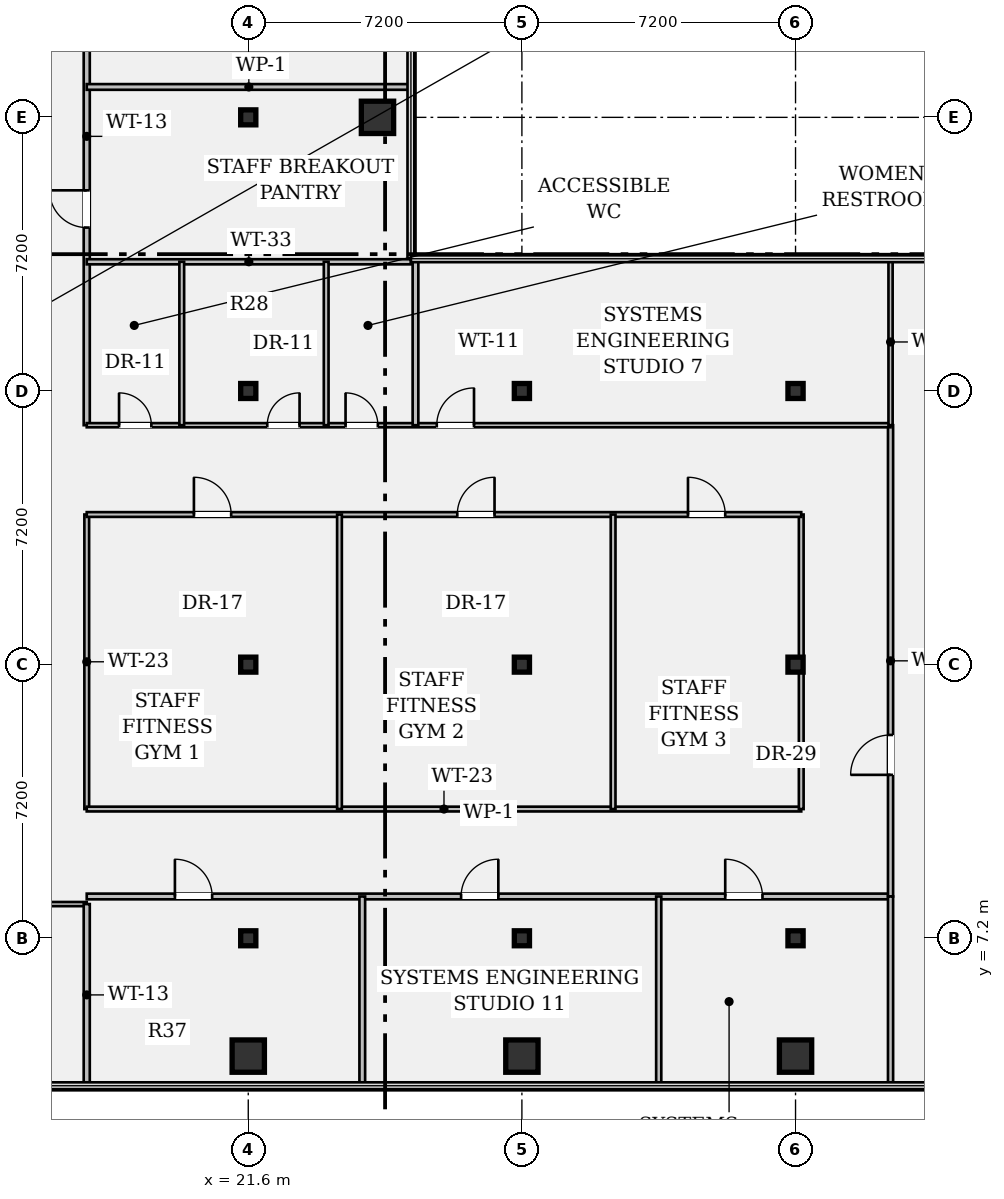
"""IFC4 building model, lengths in metres.
Left out: names, types, materials, properties, quantities, classifications, styles, units other than length and angle.
Written with IfcOpenShell. Run it as: python <this file> out.ifc"""

import sys

from ifc_helpers import new_model, si_unit, direction, frame, frame_2d, origin, origin_2d, place, context, subcontext, project, spatial, rectangle, hollow_rectangle, i_section, extrude, element, fill, save


model = new_model("IFC4")
c1 = context("Model", 3, precision=1e-05, world=origin(), true_north=direction((0.0, 1.0)))
c2 = subcontext(c1, "Body", "Model", "MODEL_VIEW")
j1 = project(units=[si_unit("LENGTHUNIT", "METRE"), si_unit("PLANEANGLEUNIT", "RADIAN")], contexts=[c1])
p1 = place(None, origin())
s1 = spatial("IfcSite", under=j1, at=p1, CompositionType="ELEMENT")
p2 = place(p1, origin())
s2 = spatial("IfcBuilding", under=s1, at=p2, CompositionType="ELEMENT")
p3 = place(p2, frame((0.0, 0.0, 159.95)))
s3 = spatial("IfcBuildingStorey", under=s2, at=p3, CompositionType="ELEMENT", Elevation=159.95)
p4 = place(p3, frame((21.6, 4.1, 0.0), z_axis=(0.0, 0.0, 1.0), x_axis=(1.0, 0.0, 0.0)))
e1 = element("IfcColumn", 1, at=p4, inside=s3, PredefinedType="COLUMN", context=c2, shape_type="SweptSolid", body=[
    extrude(hollow_rectangle(XDim=0.85, YDim=0.85, WallThickness=0.05, at=origin_2d()), origin(), (0.0, 0.0, 1.0), 3.58),
])
for number, where, z_axis, x_axis in (
    (2, (21.6, 7.2, 0.0), (0.0, 0.0, 1.0), (1.0, 0.0, 0.0)),
    (3, (21.6, 14.4, 0.0), (0.0, 0.0, 1.0), (1.0, 0.0, 0.0)),
    (4, (21.6, 21.6, 0.0), (0.0, 0.0, 1.0), (1.0, 0.0, 0.0)),
    (5, (21.6, 28.8, 0.0), (0.0, 0.0, 1.0), (1.0, 0.0, 0.0)),
):
    element("IfcColumn", number, at=place(p3, frame(where, z_axis=z_axis, x_axis=x_axis)), inside=s3, PredefinedType="COLUMN", context=c2, shape_type="SweptSolid", body=[
        extrude(i_section(OverallWidth=0.399, OverallDepth=0.394, WebThickness=0.023, FlangeThickness=0.037, FilletRadius=0.018, at=origin_2d()), origin(), (0.0, 0.0, 1.0), 3.58),
    ])
p5 = place(p3, frame((25.0, 28.8, 0.0), z_axis=(0.0, 0.0, 1.0), x_axis=(1.0, 0.0, 0.0)))
e6 = element("IfcColumn", 6, at=p5, inside=s3, PredefinedType="COLUMN", context=c2, shape_type="SweptSolid", body=[
    extrude(hollow_rectangle(XDim=0.85, YDim=0.85, WallThickness=0.05, at=origin_2d()), origin(), (0.0, 0.0, 1.0), 3.85),
])
p6 = place(p3, frame((28.8, 4.1, 0.0), z_axis=(0.0, 0.0, 1.0), x_axis=(1.0, 0.0, 0.0)))
e7 = element("IfcColumn", 7, at=p6, inside=s3, PredefinedType="COLUMN", context=c2, shape_type="SweptSolid", body=[
    extrude(hollow_rectangle(XDim=0.85, YDim=0.85, WallThickness=0.05, at=origin_2d()), origin(), (0.0, 0.0, 1.0), 3.58),
])
for number, where, z_axis, x_axis in (
    (8, (28.8, 7.2, 0.0), (0.0, 0.0, 1.0), (1.0, 0.0, 0.0)),
    (9, (28.8, 14.4, 0.0), (0.0, 0.0, 1.0), (1.0, 0.0, 0.0)),
    (10, (28.8, 21.6, 0.0), (0.0, 0.0, 1.0), (1.0, 0.0, 0.0)),
):
    element("IfcColumn", number, at=place(p3, frame(where, z_axis=z_axis, x_axis=x_axis)), inside=s3, PredefinedType="COLUMN", context=c2, shape_type="SweptSolid", body=[
        extrude(i_section(OverallWidth=0.399, OverallDepth=0.394, WebThickness=0.023, FlangeThickness=0.037, FilletRadius=0.018, at=origin_2d()), origin(), (0.0, 0.0, 1.0), 3.58),
    ])
p7 = place(p3, frame((36.0, 4.1, 0.0), z_axis=(0.0, 0.0, 1.0), x_axis=(1.0, 0.0, 0.0)))
e11 = element("IfcColumn", 11, at=p7, inside=s3, PredefinedType="COLUMN", context=c2, shape_type="SweptSolid", body=[
    extrude(hollow_rectangle(XDim=0.85, YDim=0.85, WallThickness=0.05, at=origin_2d()), origin(), (0.0, 0.0, 1.0), 3.58),
])
for number, where, z_axis, x_axis in (
    (12, (36.0, 7.2, 0.0), (0.0, 0.0, 1.0), (1.0, 0.0, 0.0)),
    (13, (36.0, 14.4, 0.0), (0.0, 0.0, 1.0), (1.0, 0.0, 0.0)),
    (14, (36.0, 21.6, 0.0), (0.0, 0.0, 1.0), (1.0, 0.0, 0.0)),
):
    element("IfcColumn", number, at=place(p3, frame(where, z_axis=z_axis, x_axis=x_axis)), inside=s3, PredefinedType="COLUMN", context=c2, shape_type="SweptSolid", body=[
        extrude(i_section(OverallWidth=0.399, OverallDepth=0.394, WebThickness=0.023, FlangeThickness=0.037, FilletRadius=0.018, at=origin_2d()), origin(), (0.0, 0.0, 1.0), 3.58),
    ])
p8 = place(p3, frame((14.4, 8.1, 0.0), z_axis=(0.0, 0.0, 1.0), x_axis=(1.0, 0.0, 0.0)))
e15 = element("IfcWall", 15, at=p8, inside=s3, PredefinedType="PARTITIONING", context=c2, shape_type="SweptSolid", body=[
    extrude(rectangle(XDim=2.95, YDim=0.11, at=frame_2d((1.475, 0.0))), origin(), (0.0, 0.0, 1.0), 3.148),
])
p9 = place(p8, frame((0.95, 0.0, 0.0)))
e16 = element("IfcOpeningElement", 16, at=p9, cuts=e15, PredefinedType="OPENING", context=c2, shape_type="SweptSolid", body=[
    extrude(rectangle(XDim=0.98, YDim=2.15, at=frame_2d((0.49, 1.075))), frame((0.0, 0.067, 0.0), z_axis=(0.0, -1.0, 0.0), x_axis=(1.0, 0.0, 0.0)), (0.0, 0.0, 1.0), 0.134),
])
p10 = place(p3, frame((17.35, 20.7, 0.0), z_axis=(0.0, 0.0, 1.0), x_axis=(0.0, 1.0, 0.0)))
e17 = element("IfcWall", 17, at=p10, inside=s3, PredefinedType="PARTITIONING", context=c2, shape_type="SweptSolid", body=[
    extrude(rectangle(XDim=15.2, YDim=0.16, at=frame_2d((7.6, 0.0))), origin(), (0.0, 0.0, 1.0), 2.869),
])
p11 = place(p10, frame((5.2, 0.0, 0.0)))
e18 = element("IfcOpeningElement", 18, at=p11, cuts=e17, PredefinedType="OPENING", context=c2, shape_type="SweptSolid", body=[
    extrude(rectangle(XDim=0.98, YDim=2.15, at=frame_2d((0.49, 1.075))), frame((0.0, 0.092, 0.0), z_axis=(0.0, -1.0, 0.0), x_axis=(1.0, 0.0, 0.0)), (0.0, 0.0, 1.0), 0.184),
])
p12 = place(p10, frame((10.6, 0.0, 0.0)))
e19 = element("IfcOpeningElement", 19, at=p12, cuts=e17, PredefinedType="OPENING", context=c2, shape_type="SweptSolid", body=[
    extrude(rectangle(XDim=1.0, YDim=2.15, at=frame_2d((0.5, 1.075))), frame((0.0, 0.092, 0.0), z_axis=(0.0, -1.0, 0.0), x_axis=(1.0, 0.0, 0.0)), (0.0, 0.0, 1.0), 0.184),
])
p13 = place(p3, frame((17.35, 8.3, 0.0), z_axis=(0.0, 0.0, 1.0), x_axis=(1.0, 0.0, 0.0)))
e20 = element("IfcWall", 20, at=p13, inside=s3, PredefinedType="PARTITIONING", context=c2, shape_type="SweptSolid", body=[
    extrude(rectangle(XDim=21.15, YDim=0.15, at=frame_2d((10.575, 0.0))), origin(), (0.0, 0.0, 1.0), 2.869),
])
p14 = place(p13, frame((2.32, 0.0, 0.0)))
e21 = element("IfcOpeningElement", 21, at=p14, cuts=e20, PredefinedType="OPENING", context=c2, shape_type="SweptSolid", body=[
    extrude(rectangle(XDim=0.98, YDim=2.15, at=frame_2d((0.49, 1.075))), frame((0.0, 0.087, 0.0), z_axis=(0.0, -1.0, 0.0), x_axis=(1.0, 0.0, 0.0)), (0.0, 0.0, 1.0), 0.174),
])
p15 = place(p13, frame((9.85, 0.0, 0.0)))
e22 = element("IfcOpeningElement", 22, at=p15, cuts=e20, PredefinedType="OPENING", context=c2, shape_type="SweptSolid", body=[
    extrude(rectangle(XDim=0.98, YDim=2.15, at=frame_2d((0.49, 1.075))), frame((0.0, 0.087, 0.0), z_axis=(0.0, -1.0, 0.0), x_axis=(1.0, 0.0, 0.0)), (0.0, 0.0, 1.0), 0.174),
])
p16 = place(p13, frame((16.8, 0.0, 0.0)))
e23 = element("IfcOpeningElement", 23, at=p16, cuts=e20, PredefinedType="OPENING", context=c2, shape_type="SweptSolid", body=[
    extrude(rectangle(XDim=0.98, YDim=2.15, at=frame_2d((0.49, 1.075))), frame((0.0, 0.087, 0.0), z_axis=(0.0, -1.0, 0.0), x_axis=(1.0, 0.0, 0.0)), (0.0, 0.0, 1.0), 0.174),
])
p17 = place(p3, frame((38.5, 8.3, 0.0), z_axis=(0.0, 0.0, 1.0), x_axis=(0.0, 1.0, 0.0)))
e24 = element("IfcWall", 24, at=p17, inside=s3, PredefinedType="PARTITIONING", context=c2, shape_type="SweptSolid", body=[
    extrude(rectangle(XDim=12.4, YDim=0.135, at=frame_2d((6.2, 0.0))), origin(), (0.0, 0.0, 1.0), 2.869),
])
p18 = place(p17, frame((3.2, 0.0, 0.0)))
e25 = element("IfcOpeningElement", 25, at=p18, cuts=e24, PredefinedType="OPENING", context=c2, shape_type="SweptSolid", body=[
    extrude(rectangle(XDim=1.05, YDim=2.15, at=frame_2d((0.525, 1.075))), frame((0.0, 0.08, 0.0), z_axis=(0.0, -1.0, 0.0), x_axis=(1.0, 0.0, 0.0)), (0.0, 0.0, 1.0), 0.159),
])
p19 = place(p3, frame((17.35, 20.7, 0.0), z_axis=(0.0, 0.0, 1.0), x_axis=(1.0, 0.0, 0.0)))
e26 = element("IfcWall", 26, at=p19, inside=s3, PredefinedType="PARTITIONING", context=c2, shape_type="SweptSolid", body=[
    extrude(rectangle(XDim=21.15, YDim=0.11, at=frame_2d((10.575, 0.0))), origin(), (0.0, 0.0, 1.0), 2.869),
])
p20 = place(p19, frame((0.85, 0.0, 0.0)))
e27 = element("IfcOpeningElement", 27, at=p20, cuts=e26, PredefinedType="OPENING", context=c2, shape_type="SweptSolid", body=[
    extrude(rectangle(XDim=0.85, YDim=2.15, at=frame_2d((0.425, 1.075))), frame((0.0, 0.067, 0.0), z_axis=(0.0, -1.0, 0.0), x_axis=(1.0, 0.0, 0.0)), (0.0, 0.0, 1.0), 0.134),
])
p21 = place(p19, frame((4.75, 0.0, 0.0)))
e28 = element("IfcOpeningElement", 28, at=p21, cuts=e26, PredefinedType="OPENING", context=c2, shape_type="SweptSolid", body=[
    extrude(rectangle(XDim=0.85, YDim=2.15, at=frame_2d((0.425, 1.075))), frame((0.0, 0.067, 0.0), z_axis=(0.0, -1.0, 0.0), x_axis=(1.0, 0.0, 0.0)), (0.0, 0.0, 1.0), 0.134),
])
p22 = place(p19, frame((6.81, 0.0, 0.0)))
e29 = element("IfcOpeningElement", 29, at=p22, cuts=e26, PredefinedType="OPENING", context=c2, shape_type="SweptSolid", body=[
    extrude(rectangle(XDim=0.85, YDim=2.15, at=frame_2d((0.425, 1.075))), frame((0.0, 0.067, 0.0), z_axis=(0.0, -1.0, 0.0), x_axis=(1.0, 0.0, 0.0)), (0.0, 0.0, 1.0), 0.134),
])
p23 = place(p19, frame((9.21, 0.0, 0.0)))
e30 = element("IfcOpeningElement", 30, at=p23, cuts=e26, PredefinedType="OPENING", context=c2, shape_type="SweptSolid", body=[
    extrude(rectangle(XDim=0.98, YDim=2.15, at=frame_2d((0.49, 1.075))), frame((0.0, 0.067, 0.0), z_axis=(0.0, -1.0, 0.0), x_axis=(1.0, 0.0, 0.0)), (0.0, 0.0, 1.0), 0.134),
])
p24 = place(p3, frame((17.35, 10.6, 0.0), z_axis=(0.0, 0.0, 1.0), x_axis=(0.0, 1.0, 0.0)))
e31 = element("IfcWall", 31, at=p24, inside=s3, PredefinedType="PARTITIONING", context=c2, shape_type="SweptSolid", body=[
    extrude(rectangle(XDim=7.75, YDim=0.125, at=frame_2d((3.875, 0.0))), origin(), (0.0, 0.0, 1.0), 2.869),
])
p25 = place(p3, frame((17.35, 10.6, 0.0), z_axis=(0.0, 0.0, 1.0), x_axis=(1.0, 0.0, 0.0)))
e32 = element("IfcWall", 32, at=p25, inside=s3, PredefinedType="PARTITIONING", context=c2, shape_type="SweptSolid", body=[
    extrude(rectangle(XDim=18.8, YDim=0.125, at=frame_2d((9.4, 0.0))), origin(), (0.0, 0.0, 1.0), 2.869),
])
p26 = place(p3, frame((36.15, 10.6, 0.0), z_axis=(0.0, 0.0, 1.0), x_axis=(0.0, 1.0, 0.0)))
e33 = element("IfcWall", 33, at=p26, inside=s3, PredefinedType="PARTITIONING", context=c2, shape_type="SweptSolid", body=[
    extrude(rectangle(XDim=7.75, YDim=0.125, at=frame_2d((3.875, 0.0))), origin(), (0.0, 0.0, 1.0), 2.869),
])
p27 = place(p3, frame((17.35, 18.35, 0.0), z_axis=(0.0, 0.0, 1.0), x_axis=(1.0, 0.0, 0.0)))
e34 = element("IfcWall", 34, at=p27, inside=s3, PredefinedType="PARTITIONING", context=c2, shape_type="SweptSolid", body=[
    extrude(rectangle(XDim=18.8, YDim=0.125, at=frame_2d((9.4, 0.0))), origin(), (0.0, 0.0, 1.0), 2.869),
])
p28 = place(p27, frame((2.82, 0.0, 0.0)))
e35 = element("IfcOpeningElement", 35, at=p28, cuts=e34, PredefinedType="OPENING", context=c2, shape_type="SweptSolid", body=[
    extrude(rectangle(XDim=0.98, YDim=2.15, at=frame_2d((0.49, 1.075))), frame((0.0, 0.074, 0.0), z_axis=(0.0, -1.0, 0.0), x_axis=(1.0, 0.0, 0.0)), (0.0, 0.0, 1.0), 0.149),
])
p29 = place(p27, frame((9.75, 0.0, 0.0)))
e36 = element("IfcOpeningElement", 36, at=p29, cuts=e34, PredefinedType="OPENING", context=c2, shape_type="SweptSolid", body=[
    extrude(rectangle(XDim=0.98, YDim=2.15, at=frame_2d((0.49, 1.075))), frame((0.0, 0.074, 0.0), z_axis=(0.0, -1.0, 0.0), x_axis=(1.0, 0.0, 0.0)), (0.0, 0.0, 1.0), 0.149),
])
p30 = place(p27, frame((15.82, 0.0, 0.0)))
e37 = element("IfcOpeningElement", 37, at=p30, cuts=e34, PredefinedType="OPENING", context=c2, shape_type="SweptSolid", body=[
    extrude(rectangle(XDim=0.98, YDim=2.15, at=frame_2d((0.49, 1.075))), frame((0.0, 0.074, 0.0), z_axis=(0.0, -1.0, 0.0), x_axis=(1.0, 0.0, 0.0)), (0.0, 0.0, 1.0), 0.149),
])
for number, where, z_axis, x_axis in (
    (38, (24.0, 10.6, 0.0), (0.0, 0.0, 1.0), (0.0, 1.0, 0.0)),
    (39, (31.2, 10.6, 0.0), (0.0, 0.0, 1.0), (0.0, 1.0, 0.0)),
):
    element("IfcWall", number, at=place(p3, frame(where, z_axis=z_axis, x_axis=x_axis)), inside=s3, PredefinedType="PARTITIONING", context=c2, shape_type="SweptSolid", body=[
        extrude(rectangle(XDim=7.75, YDim=0.125, at=frame_2d((3.875, 0.0))), origin(), (0.0, 0.0, 1.0), 2.869),
    ])
p31 = place(p3, frame((17.35, 25.0, 0.0), z_axis=(0.0, 0.0, 1.0), x_axis=(1.0, 0.0, 0.0)))
e40 = element("IfcWall", 40, at=p31, inside=s3, PredefinedType="PARTITIONING", context=c2, shape_type="SweptSolid", body=[
    extrude(rectangle(XDim=8.53, YDim=0.135, at=frame_2d((4.265, 0.0))), origin(), (0.0, 0.0, 1.0), 2.869),
])
for number, where, z_axis, x_axis in (
    (41, (19.85, 20.7, 0.0), (0.0, 0.0, 1.0), (0.0, 1.0, 0.0)),
    (42, (23.65, 20.7, 0.0), (0.0, 0.0, 1.0), (0.0, 1.0, 0.0)),
):
    element("IfcWall", number, at=place(p3, frame(where, z_axis=z_axis, x_axis=x_axis)), inside=s3, PredefinedType="PARTITIONING", context=c2, shape_type="SweptSolid", body=[
        extrude(rectangle(XDim=4.3, YDim=0.125, at=frame_2d((2.15, 0.0))), origin(), (0.0, 0.0, 1.0), 2.869),
    ])
p32 = place(p3, frame((17.35, 29.6, 0.0), z_axis=(0.0, 0.0, 1.0), x_axis=(1.0, 0.0, 0.0)))
e43 = element("IfcWall", 43, at=p32, inside=s3, PredefinedType="PARTITIONING", context=c2, shape_type="SweptSolid", body=[
    extrude(rectangle(XDim=8.53, YDim=0.15, at=frame_2d((4.265, 0.0))), origin(), (0.0, 0.0, 1.0), 2.869),
])
p33 = place(p3, frame((26.0, 20.7, 0.0), z_axis=(0.0, 0.0, 1.0), x_axis=(0.0, 1.0, 0.0)))
e44 = element("IfcWall", 44, at=p33, inside=s3, PredefinedType="PARTITIONING", context=c2, shape_type="SweptSolid", body=[
    extrude(rectangle(XDim=4.38, YDim=0.15, at=frame_2d((2.19, 0.0))), origin(), (0.0, 0.0, 1.0), 2.869),
])
p34 = place(p3, frame((38.5, 3.32, 0.0), z_axis=(0.0, 0.0, 1.0), x_axis=(0.0, 1.0, 0.0)))
e45 = element("IfcWall", 45, at=p34, inside=s3, PredefinedType="PARTITIONING", context=c2, shape_type="SweptSolid", body=[
    extrude(rectangle(XDim=4.98, YDim=0.135, at=frame_2d((2.49, 0.0))), origin(), (0.0, 0.0, 1.0), 2.869),
])
p35 = place(p3, frame((38.5, 20.7, 0.0), z_axis=(0.0, 0.0, 1.0), x_axis=(0.0, 1.0, 0.0)))
e46 = element("IfcWall", 46, at=p35, inside=s3, PredefinedType="PARTITIONING", context=c2, shape_type="SweptSolid", body=[
    extrude(rectangle(XDim=4.38, YDim=0.11, at=frame_2d((2.19, 0.0))), origin(), (0.0, 0.0, 1.0), 2.869),
])
p36 = place(p3, frame((17.35, 3.32, 0.0), z_axis=(0.0, 0.0, 1.0), x_axis=(0.0, 1.0, 0.0)))
e47 = element("IfcWall", 47, at=p36, inside=s3, PredefinedType="PARTITIONING", context=c2, shape_type="SweptSolid", body=[
    extrude(rectangle(XDim=4.78, YDim=0.16, at=frame_2d((2.39, 0.0))), origin(), (0.0, 0.0, 1.0), 2.869),
])
p37 = place(p3, frame((24.6, 3.32, 0.0), z_axis=(0.0, 0.0, 1.0), x_axis=(0.0, 1.0, 0.0)))
e48 = element("IfcWall", 48, at=p37, inside=s3, PredefinedType="PARTITIONING", context=c2, shape_type="SweptSolid", body=[
    extrude(rectangle(XDim=4.98, YDim=0.15, at=frame_2d((2.49, 0.0))), origin(), (0.0, 0.0, 1.0), 2.869),
])
p38 = place(p3, frame((32.4, 3.32, 0.0), z_axis=(0.0, 0.0, 1.0), x_axis=(0.0, 1.0, 0.0)))
e49 = element("IfcWall", 49, at=p38, inside=s3, PredefinedType="PARTITIONING", context=c2, shape_type="SweptSolid", body=[
    extrude(rectangle(XDim=4.98, YDim=0.135, at=frame_2d((2.49, 0.0))), origin(), (0.0, 0.0, 1.0), 2.869),
])
p39 = place(p28, origin())
e50 = element("IfcDoor", 50, at=p39, inside=s3, OperationType="SINGLE_SWING_LEFT", PredefinedType="DOOR", context=c2, shape_type="SweptSolid", body=[
    extrude(rectangle(XDim=0.98, YDim=2.15, at=frame_2d((0.49, 1.075))), frame((0.0, 0.025, 0.0), z_axis=(0.0, -1.0, 0.0), x_axis=(1.0, 0.0, 0.0)), (0.0, 0.0, 1.0), 0.05),
])
fill(e35, e50)
p40 = place(p29, origin())
e51 = element("IfcDoor", 51, at=p40, inside=s3, OperationType="SINGLE_SWING_RIGHT", PredefinedType="DOOR", context=c2, shape_type="SweptSolid", body=[
    extrude(rectangle(XDim=0.98, YDim=2.15, at=frame_2d((0.49, 1.075))), frame((0.0, 0.025, 0.0), z_axis=(0.0, -1.0, 0.0), x_axis=(1.0, 0.0, 0.0)), (0.0, 0.0, 1.0), 0.05),
])
fill(e36, e51)
p41 = place(p30, origin())
e52 = element("IfcDoor", 52, at=p41, inside=s3, OperationType="SINGLE_SWING_LEFT", PredefinedType="DOOR", context=c2, shape_type="SweptSolid", body=[
    extrude(rectangle(XDim=0.98, YDim=2.15, at=frame_2d((0.49, 1.075))), frame((0.0, 0.025, 0.0), z_axis=(0.0, -1.0, 0.0), x_axis=(1.0, 0.0, 0.0)), (0.0, 0.0, 1.0), 0.05),
])
fill(e37, e52)
p42 = place(p20, origin())
e53 = element("IfcDoor", 53, at=p42, inside=s3, OperationType="SINGLE_SWING_LEFT", PredefinedType="DOOR", context=c2, shape_type="SweptSolid", body=[
    extrude(rectangle(XDim=0.85, YDim=2.15, at=frame_2d((0.425, 1.075))), frame((0.0, 0.025, 0.0), z_axis=(0.0, -1.0, 0.0), x_axis=(1.0, 0.0, 0.0)), (0.0, 0.0, 1.0), 0.05),
])
fill(e27, e53)
p43 = place(p21, origin())
e54 = element("IfcDoor", 54, at=p43, inside=s3, OperationType="SINGLE_SWING_RIGHT", PredefinedType="DOOR", context=c2, shape_type="SweptSolid", body=[
    extrude(rectangle(XDim=0.85, YDim=2.15, at=frame_2d((0.425, 1.075))), frame((0.0, 0.025, 0.0), z_axis=(0.0, -1.0, 0.0), x_axis=(1.0, 0.0, 0.0)), (0.0, 0.0, 1.0), 0.05),
])
fill(e28, e54)
p44 = place(p22, origin())
e55 = element("IfcDoor", 55, at=p44, inside=s3, OperationType="SINGLE_SWING_LEFT", PredefinedType="DOOR", context=c2, shape_type="SweptSolid", body=[
    extrude(rectangle(XDim=0.85, YDim=2.15, at=frame_2d((0.425, 1.075))), frame((0.0, 0.025, 0.0), z_axis=(0.0, -1.0, 0.0), x_axis=(1.0, 0.0, 0.0)), (0.0, 0.0, 1.0), 0.05),
])
fill(e29, e55)
p45 = place(p11, origin())
e56 = element("IfcDoor", 56, at=p45, inside=s3, OperationType="SINGLE_SWING_RIGHT", PredefinedType="DOOR", context=c2, shape_type="SweptSolid", body=[
    extrude(rectangle(XDim=0.98, YDim=2.15, at=frame_2d((0.49, 1.075))), frame((0.0, 0.025, 0.0), z_axis=(0.0, -1.0, 0.0), x_axis=(1.0, 0.0, 0.0)), (0.0, 0.0, 1.0), 0.05),
])
fill(e18, e56)
p46 = place(p23, origin())
e57 = element("IfcDoor", 57, at=p46, inside=s3, OperationType="SINGLE_SWING_RIGHT", PredefinedType="DOOR", context=c2, shape_type="SweptSolid", body=[
    extrude(rectangle(XDim=0.98, YDim=2.15, at=frame_2d((0.49, 1.075))), frame((0.0, 0.025, 0.0), z_axis=(0.0, -1.0, 0.0), x_axis=(1.0, 0.0, 0.0)), (0.0, 0.0, 1.0), 0.05),
])
fill(e30, e57)
p47 = place(p18, origin())
e58 = element("IfcDoor", 58, at=p47, inside=s3, OperationType="SINGLE_SWING_LEFT", PredefinedType="DOOR", context=c2, shape_type="SweptSolid", body=[
    extrude(rectangle(XDim=1.05, YDim=2.15, at=frame_2d((0.525, 1.075))), frame((0.0, 0.025, 0.0), z_axis=(0.0, -1.0, 0.0), x_axis=(1.0, 0.0, 0.0)), (0.0, 0.0, 1.0), 0.05),
])
fill(e25, e58)
p48 = place(p14, origin())
e59 = element("IfcDoor", 59, at=p48, inside=s3, OperationType="SINGLE_SWING_LEFT", PredefinedType="DOOR", context=c2, shape_type="SweptSolid", body=[
    extrude(rectangle(XDim=0.98, YDim=2.15, at=frame_2d((0.49, 1.075))), frame((0.0, 0.025, 0.0), z_axis=(0.0, -1.0, 0.0), x_axis=(1.0, 0.0, 0.0)), (0.0, 0.0, 1.0), 0.05),
])
fill(e21, e59)
p49 = place(p15, origin())
e60 = element("IfcDoor", 60, at=p49, inside=s3, OperationType="SINGLE_SWING_RIGHT", PredefinedType="DOOR", context=c2, shape_type="SweptSolid", body=[
    extrude(rectangle(XDim=0.98, YDim=2.15, at=frame_2d((0.49, 1.075))), frame((0.0, 0.025, 0.0), z_axis=(0.0, -1.0, 0.0), x_axis=(1.0, 0.0, 0.0)), (0.0, 0.0, 1.0), 0.05),
])
fill(e22, e60)
p50 = place(p16, origin())
e61 = element("IfcDoor", 61, at=p50, inside=s3, OperationType="SINGLE_SWING_LEFT", PredefinedType="DOOR", context=c2, shape_type="SweptSolid", body=[
    extrude(rectangle(XDim=0.98, YDim=2.15, at=frame_2d((0.49, 1.075))), frame((0.0, 0.025, 0.0), z_axis=(0.0, -1.0, 0.0), x_axis=(1.0, 0.0, 0.0)), (0.0, 0.0, 1.0), 0.05),
])
fill(e23, e61)
save(model, sys.argv[1])
